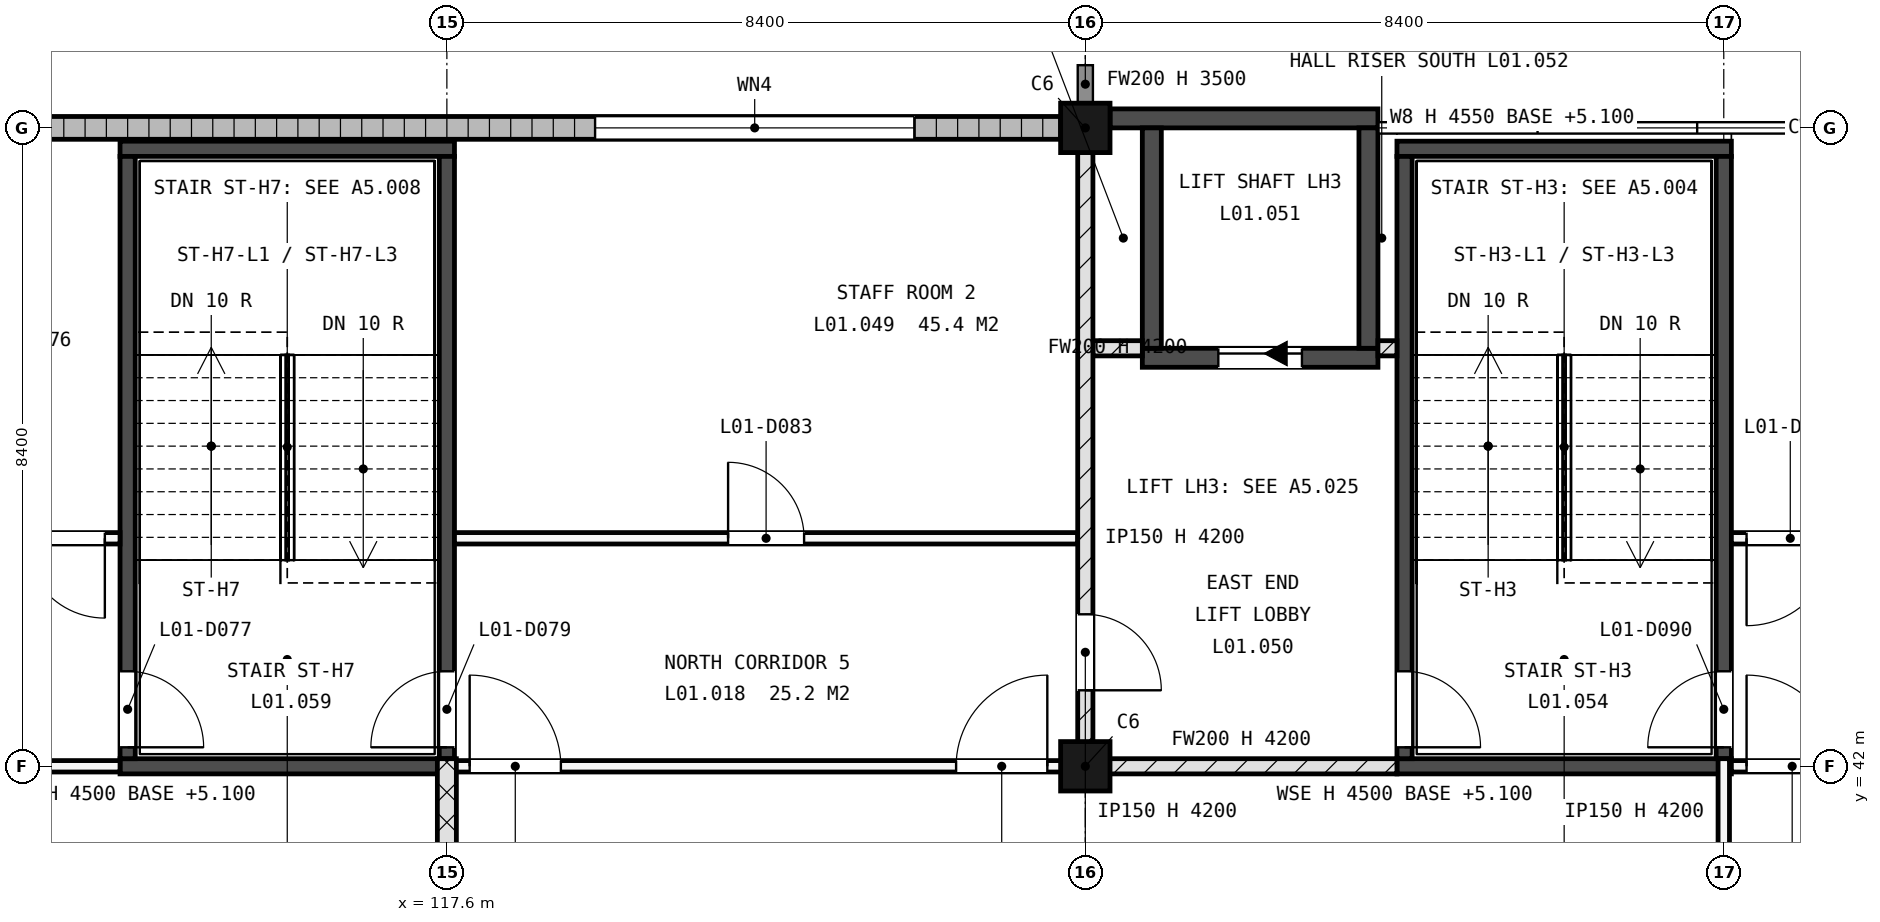
"""IFC4 building model, lengths in metres.
Left out: names, types, materials, properties, quantities, classifications, styles, units other than length and angle.
Written with IfcOpenShell. Run it as: python <this file> out.ifc"""

import sys

from ifc_helpers import new_model, si_unit, direction, frame, frame_2d, origin, origin_2d, place, context, subcontext, project, spatial, rectangle, extrude, element, fill, save


model = new_model("IFC4")
c1 = context("Model", 3, precision=1e-05, world=origin(), true_north=direction((0.0, 1.0)))
c2 = subcontext(c1, "Body", "Model", "MODEL_VIEW")
j1 = project(units=[si_unit("LENGTHUNIT", "METRE"), si_unit("PLANEANGLEUNIT", "RADIAN")], contexts=[c1])
p1 = place(None, origin())
s1 = spatial("IfcSite", under=j1, at=p1, CompositionType="ELEMENT")
p2 = place(p1, origin())
s2 = spatial("IfcBuilding", under=s1, at=p2, CompositionType="ELEMENT")
p3 = place(p2, frame((0.0, 0.0, 5.4)))
s3 = spatial("IfcBuildingStorey", under=s2, at=p3, CompositionType="ELEMENT", Elevation=5.4)
for number, where, z_axis, x_axis in (
    (1, (126.0, 42.0, -0.3), (0.0, 0.0, 1.0), (1.0, 0.0, 0.0)),
    (2, (126.0, 50.4, -0.3), (0.0, 0.0, 1.0), (1.0, 0.0, 0.0)),
):
    element("IfcColumn", number, at=place(p3, frame(where, z_axis=z_axis, x_axis=x_axis)), inside=s3, PredefinedType="COLUMN", context=c2, shape_type="SweptSolid", body=[
        extrude(rectangle(XDim=0.65, YDim=0.65, at=origin_2d()), origin(), (0.0, 0.0, 1.0), 4.55),
    ])
p4 = place(p3, frame((126.75, 47.375, -0.3), z_axis=(0.0, 0.0, 1.0), x_axis=(1.0, 0.0, 0.0)))
e3 = element("IfcWall", 3, at=p4, inside=s3, PredefinedType="SHEAR", context=c2, shape_type="SweptSolid", body=[
    extrude(rectangle(XDim=3.1, YDim=0.25, at=frame_2d((1.55, 0.0))), origin(), (0.0, 0.0, 1.0), 4.55),
])
p5 = place(p4, frame((1.0, 0.0, 0.3)))
e4 = element("IfcOpeningElement", 4, at=p5, cuts=e3, PredefinedType="OPENING", context=c2, shape_type="SweptSolid", body=[
    extrude(rectangle(XDim=1.1, YDim=2.1, at=frame_2d((0.55, 1.05))), frame((0.0, 0.135, 0.0), z_axis=(0.0, -1.0, 0.0), x_axis=(1.0, 0.0, 0.0)), (0.0, 0.0, 1.0), 0.27),
])
p6 = place(p3, frame((126.325, 50.525, -0.3), z_axis=(0.0, 0.0, 1.0), x_axis=(1.0, 0.0, 0.0)))
e5 = element("IfcWall", 5, at=p6, inside=s3, PredefinedType="SHEAR", context=c2, shape_type="SweptSolid", body=[
    extrude(rectangle(XDim=3.525, YDim=0.25, at=frame_2d((1.763, 0.0))), origin(), (0.0, 0.0, 1.0), 4.55),
])
for number, where, z_axis, x_axis in (
    (6, (126.875, 47.5, -0.3), (0.0, 0.0, 1.0), (0.0, 1.0, 0.0)),
    (7, (129.725, 47.5, -0.3), (0.0, 0.0, 1.0), (0.0, 1.0, 0.0)),
):
    element("IfcWall", number, at=place(p3, frame(where, z_axis=z_axis, x_axis=x_axis)), inside=s3, PredefinedType="SHEAR", context=c2, shape_type="SweptSolid", body=[
        extrude(rectangle(XDim=2.9, YDim=0.25, at=frame_2d((1.45, 0.0))), origin(), (0.0, 0.0, 1.0), 4.55),
    ])
p7 = place(p3, frame((109.525, 50.4, 0.0), z_axis=(0.0, 0.0, 1.0), x_axis=(1.0, 0.0, 0.0)))
e8 = element("IfcWall", 8, at=p7, inside=s3, PredefinedType="STANDARD", context=c2, shape_type="SweptSolid", body=[
    extrude(rectangle(XDim=16.15, YDim=0.3, at=frame_2d((8.075, 0.0))), origin(), (0.0, 0.0, 1.0), 4.2),
])
p8 = place(p7, frame((1.337, 0.0, 0.9)))
e9 = element("IfcOpeningElement", 9, at=p8, cuts=e8, PredefinedType="OPENING", context=c2, shape_type="SweptSolid", body=[
    extrude(rectangle(XDim=1.2, YDim=1.5, at=frame_2d((0.6, 0.75))), frame((0.0, 0.16, 0.0), z_axis=(0.0, -1.0, 0.0), x_axis=(1.0, 0.0, 0.0)), (0.0, 0.0, 1.0), 0.32),
])
p9 = place(p7, frame((10.025, 0.0, 0.9)))
e10 = element("IfcOpeningElement", 10, at=p9, cuts=e8, PredefinedType="OPENING", context=c2, shape_type="SweptSolid", body=[
    extrude(rectangle(XDim=4.2, YDim=1.5, at=frame_2d((2.1, 0.75))), frame((0.0, 0.16, 0.0), z_axis=(0.0, -1.0, 0.0), x_axis=(1.0, 0.0, 0.0)), (0.0, 0.0, 1.0), 0.32),
])
for number, where, z_axis, x_axis in (
    (11, (130.1, 42.0, -0.3), (0.0, 0.0, 1.0), (1.0, 0.0, 0.0)),
    (12, (130.1, 50.125, -0.3), (0.0, 0.0, 1.0), (1.0, 0.0, 0.0)),
):
    element("IfcWall", number, at=place(p3, frame(where, z_axis=z_axis, x_axis=x_axis)), inside=s3, PredefinedType="SHEAR", context=c2, shape_type="SweptSolid", body=[
        extrude(rectangle(XDim=4.4, YDim=0.2, at=frame_2d((2.2, 0.0))), origin(), (0.0, 0.0, 1.0), 4.5),
    ])
p10 = place(p3, frame((130.2, 42.1, -0.3), z_axis=(0.0, 0.0, 1.0), x_axis=(0.0, 1.0, 0.0)))
e13 = element("IfcWall", 13, at=p10, inside=s3, PredefinedType="SHEAR", context=c2, shape_type="SweptSolid", body=[
    extrude(rectangle(XDim=7.925, YDim=0.2, at=frame_2d((3.962, 0.0))), origin(), (0.0, 0.0, 1.0), 4.5),
])
p11 = place(p10, frame((0.15, 0.0, 0.3)))
e14 = element("IfcOpeningElement", 14, at=p11, cuts=e13, PredefinedType="OPENING", context=c2, shape_type="SweptSolid", body=[
    extrude(rectangle(XDim=1.0, YDim=2.1, at=frame_2d((0.5, 1.05))), frame((0.0, 0.11, 0.0), z_axis=(0.0, -1.0, 0.0), x_axis=(1.0, 0.0, 0.0)), (0.0, 0.0, 1.0), 0.22),
])
p12 = place(p3, frame((134.4, 42.1, -0.3), z_axis=(0.0, 0.0, 1.0), x_axis=(0.0, 1.0, 0.0)))
e15 = element("IfcWall", 15, at=p12, inside=s3, PredefinedType="SHEAR", context=c2, shape_type="SweptSolid", body=[
    extrude(rectangle(XDim=7.925, YDim=0.2, at=frame_2d((3.962, 0.0))), origin(), (0.0, 0.0, 1.0), 4.5),
])
p13 = place(p12, frame((0.15, 0.0, 0.3)))
e16 = element("IfcOpeningElement", 16, at=p13, cuts=e15, PredefinedType="OPENING", context=c2, shape_type="SweptSolid", body=[
    extrude(rectangle(XDim=1.0, YDim=2.1, at=frame_2d((0.5, 1.05))), frame((0.0, 0.11, 0.0), z_axis=(0.0, -1.0, 0.0), x_axis=(1.0, 0.0, 0.0)), (0.0, 0.0, 1.0), 0.22),
])
for number, where, z_axis, x_axis in (
    (17, (113.3, 42.0, -0.3), (0.0, 0.0, 1.0), (1.0, 0.0, 0.0)),
    (18, (113.3, 50.125, -0.3), (0.0, 0.0, 1.0), (1.0, 0.0, 0.0)),
):
    element("IfcWall", number, at=place(p3, frame(where, z_axis=z_axis, x_axis=x_axis)), inside=s3, PredefinedType="SHEAR", context=c2, shape_type="SweptSolid", body=[
        extrude(rectangle(XDim=4.4, YDim=0.2, at=frame_2d((2.2, 0.0))), origin(), (0.0, 0.0, 1.0), 4.5),
    ])
p14 = place(p3, frame((113.4, 42.1, -0.3), z_axis=(0.0, 0.0, 1.0), x_axis=(0.0, 1.0, 0.0)))
e19 = element("IfcWall", 19, at=p14, inside=s3, PredefinedType="SHEAR", context=c2, shape_type="SweptSolid", body=[
    extrude(rectangle(XDim=7.925, YDim=0.2, at=frame_2d((3.962, 0.0))), origin(), (0.0, 0.0, 1.0), 4.5),
])
p15 = place(p14, frame((0.15, 0.0, 0.3)))
e20 = element("IfcOpeningElement", 20, at=p15, cuts=e19, PredefinedType="OPENING", context=c2, shape_type="SweptSolid", body=[
    extrude(rectangle(XDim=1.0, YDim=2.1, at=frame_2d((0.5, 1.05))), frame((0.0, 0.11, 0.0), z_axis=(0.0, -1.0, 0.0), x_axis=(1.0, 0.0, 0.0)), (0.0, 0.0, 1.0), 0.22),
])
p16 = place(p3, frame((117.6, 42.1, -0.3), z_axis=(0.0, 0.0, 1.0), x_axis=(0.0, 1.0, 0.0)))
e21 = element("IfcWall", 21, at=p16, inside=s3, PredefinedType="SHEAR", context=c2, shape_type="SweptSolid", body=[
    extrude(rectangle(XDim=7.925, YDim=0.2, at=frame_2d((3.962, 0.0))), origin(), (0.0, 0.0, 1.0), 4.5),
])
p17 = place(p16, frame((0.15, 0.0, 0.3)))
e22 = element("IfcOpeningElement", 22, at=p17, cuts=e21, PredefinedType="OPENING", context=c2, shape_type="SweptSolid", body=[
    extrude(rectangle(XDim=1.0, YDim=2.1, at=frame_2d((0.5, 1.05))), frame((0.0, 0.11, 0.0), z_axis=(0.0, -1.0, 0.0), x_axis=(1.0, 0.0, 0.0)), (0.0, 0.0, 1.0), 0.22),
])
p18 = place(p3, frame((108.895, 42.0, 0.0), z_axis=(0.0, 0.0, 1.0), x_axis=(1.0, 0.0, 0.0)))
e23 = element("IfcWall", 23, at=p18, inside=s3, PredefinedType="PARTITIONING", context=c2, shape_type="SweptSolid", body=[
    extrude(rectangle(XDim=4.405, YDim=0.15, at=frame_2d((2.203, 0.0))), origin(), (0.0, 0.0, 1.0), 4.2),
])
p19 = place(p3, frame((117.7, 42.0, 0.0), z_axis=(0.0, 0.0, 1.0), x_axis=(1.0, 0.0, 0.0)))
e24 = element("IfcWall", 24, at=p19, inside=s3, PredefinedType="PARTITIONING", context=c2, shape_type="SweptSolid", body=[
    extrude(rectangle(XDim=8.3, YDim=0.15, at=frame_2d((4.15, 0.0))), origin(), (0.0, 0.0, 1.0), 4.2),
])
p20 = place(p19, frame((0.2, 0.0, 0.0)))
e25 = element("IfcOpeningElement", 25, at=p20, cuts=e24, PredefinedType="OPENING", context=c2, shape_type="SweptSolid", body=[
    extrude(rectangle(XDim=1.2, YDim=2.1, at=frame_2d((0.6, 1.05))), frame((0.0, 0.085, 0.0), z_axis=(0.0, -1.0, 0.0), x_axis=(1.0, 0.0, 0.0)), (0.0, 0.0, 1.0), 0.17),
])
p21 = place(p19, frame((6.6, 0.0, 0.0)))
e26 = element("IfcOpeningElement", 26, at=p21, cuts=e24, PredefinedType="OPENING", context=c2, shape_type="SweptSolid", body=[
    extrude(rectangle(XDim=1.2, YDim=2.1, at=frame_2d((0.6, 1.05))), frame((0.0, 0.085, 0.0), z_axis=(0.0, -1.0, 0.0), x_axis=(1.0, 0.0, 0.0)), (0.0, 0.0, 1.0), 0.17),
])
p22 = place(p3, frame((126.0, 42.0, 0.0), z_axis=(0.0, 0.0, 1.0), x_axis=(1.0, 0.0, 0.0)))
e27 = element("IfcWall", 27, at=p22, inside=s3, PredefinedType="SOLIDWALL", context=c2, shape_type="SweptSolid", body=[
    extrude(rectangle(XDim=4.1, YDim=0.2, at=frame_2d((2.05, 0.0))), origin(), (0.0, 0.0, 1.0), 4.2),
])
p23 = place(p3, frame((134.5, 42.0, 0.0), z_axis=(0.0, 0.0, 1.0), x_axis=(1.0, 0.0, 0.0)))
e28 = element("IfcWall", 28, at=p23, inside=s3, PredefinedType="PARTITIONING", context=c2, shape_type="SweptSolid", body=[
    extrude(rectangle(XDim=8.605, YDim=0.15, at=frame_2d((4.302, 0.0))), origin(), (0.0, 0.0, 1.0), 4.2),
])
p24 = place(p23, frame((0.2, 0.0, 0.0)))
e29 = element("IfcOpeningElement", 29, at=p24, cuts=e28, PredefinedType="OPENING", context=c2, shape_type="SweptSolid", body=[
    extrude(rectangle(XDim=1.2, YDim=2.1, at=frame_2d((0.6, 1.05))), frame((0.0, 0.085, 0.0), z_axis=(0.0, -1.0, 0.0), x_axis=(1.0, 0.0, 0.0)), (0.0, 0.0, 1.0), 0.17),
])
p25 = place(p3, frame((92.5, 45.0, 0.0), z_axis=(0.0, 0.0, 1.0), x_axis=(1.0, 0.0, 0.0)))
e30 = element("IfcWall", 30, at=p25, inside=s3, PredefinedType="PARTITIONING", context=c2, shape_type="SweptSolid", body=[
    extrude(rectangle(XDim=20.8, YDim=0.15, at=frame_2d((10.4, 0.0))), origin(), (0.0, 0.0, 1.0), 4.2),
])
p26 = place(p25, frame((0.2, 0.0, 0.0)))
e31 = element("IfcOpeningElement", 31, at=p26, cuts=e30, PredefinedType="OPENING", context=c2, shape_type="SweptSolid", body=[
    extrude(rectangle(XDim=2.1, YDim=2.25, at=frame_2d((1.05, 1.125))), frame((0.0, 0.085, 0.0), z_axis=(0.0, -1.0, 0.0), x_axis=(1.0, 0.0, 0.0)), (0.0, 0.0, 1.0), 0.17),
])
p27 = place(p25, frame((18.5, 0.0, 0.0)))
e32 = element("IfcOpeningElement", 32, at=p27, cuts=e30, PredefinedType="OPENING", context=c2, shape_type="SweptSolid", body=[
    extrude(rectangle(XDim=2.1, YDim=2.25, at=frame_2d((1.05, 1.125))), frame((0.0, 0.085, 0.0), z_axis=(0.0, -1.0, 0.0), x_axis=(1.0, 0.0, 0.0)), (0.0, 0.0, 1.0), 0.17),
])
p28 = place(p3, frame((117.7, 45.0, 0.0), z_axis=(0.0, 0.0, 1.0), x_axis=(1.0, 0.0, 0.0)))
e33 = element("IfcWall", 33, at=p28, inside=s3, PredefinedType="PARTITIONING", context=c2, shape_type="SweptSolid", body=[
    extrude(rectangle(XDim=8.2, YDim=0.15, at=frame_2d((4.1, 0.0))), origin(), (0.0, 0.0, 1.0), 4.2),
])
p29 = place(p28, frame((3.6, 0.0, 0.0)))
e34 = element("IfcOpeningElement", 34, at=p29, cuts=e33, PredefinedType="OPENING", context=c2, shape_type="SweptSolid", body=[
    extrude(rectangle(XDim=1.0, YDim=2.1, at=frame_2d((0.5, 1.05))), frame((0.0, 0.085, 0.0), z_axis=(0.0, -1.0, 0.0), x_axis=(1.0, 0.0, 0.0)), (0.0, 0.0, 1.0), 0.17),
])
p30 = place(p3, frame((134.5, 45.0, 0.0), z_axis=(0.0, 0.0, 1.0), x_axis=(1.0, 0.0, 0.0)))
e35 = element("IfcWall", 35, at=p30, inside=s3, PredefinedType="PARTITIONING", context=c2, shape_type="SweptSolid", body=[
    extrude(rectangle(XDim=29.2, YDim=0.15, at=frame_2d((14.6, 0.0))), origin(), (0.0, 0.0, 1.0), 4.2),
])
p31 = place(p30, frame((0.2, 0.0, 0.0)))
e36 = element("IfcOpeningElement", 36, at=p31, cuts=e35, PredefinedType="OPENING", context=c2, shape_type="SweptSolid", body=[
    extrude(rectangle(XDim=1.15, YDim=2.1, at=frame_2d((0.575, 1.05))), frame((0.0, 0.085, 0.0), z_axis=(0.0, -1.0, 0.0), x_axis=(1.0, 0.0, 0.0)), (0.0, 0.0, 1.0), 0.17),
])
p32 = place(p30, frame((27.85, 0.0, 0.0)))
e37 = element("IfcOpeningElement", 37, at=p32, cuts=e35, PredefinedType="OPENING", context=c2, shape_type="SweptSolid", body=[
    extrude(rectangle(XDim=1.15, YDim=2.1, at=frame_2d((0.575, 1.05))), frame((0.0, 0.085, 0.0), z_axis=(0.0, -1.0, 0.0), x_axis=(1.0, 0.0, 0.0)), (0.0, 0.0, 1.0), 0.17),
])
p33 = place(p3, frame((126.1, 47.5, 0.0), z_axis=(0.0, 0.0, 1.0), x_axis=(1.0, 0.0, 0.0)))
e38 = element("IfcWall", 38, at=p33, inside=s3, PredefinedType="SOLIDWALL", context=c2, shape_type="SweptSolid", body=[
    extrude(rectangle(XDim=0.65, YDim=0.2, at=frame_2d((0.325, 0.0))), origin(), (0.0, 0.0, 1.0), 4.2),
])
p34 = place(p3, frame((129.85, 47.5, 0.0), z_axis=(0.0, 0.0, 1.0), x_axis=(1.0, 0.0, 0.0)))
e39 = element("IfcWall", 39, at=p34, inside=s3, PredefinedType="SOLIDWALL", context=c2, shape_type="SweptSolid", body=[
    extrude(rectangle(XDim=0.25, YDim=0.2, at=frame_2d((0.125, 0.0))), origin(), (0.0, 0.0, 1.0), 4.2),
])
p35 = place(p3, frame((117.6, 33.295, 0.0), z_axis=(0.0, 0.0, 1.0), x_axis=(0.0, 1.0, 0.0)))
e40 = element("IfcWall", 40, at=p35, inside=s3, PredefinedType="SOLIDWALL", context=c2, shape_type="SweptSolid", body=[
    extrude(rectangle(XDim=8.805, YDim=0.25, at=frame_2d((4.403, 0.0))), origin(), (0.0, 0.0, 1.0), 4.2),
])
p36 = place(p3, frame((126.0, 42.1, 0.0), z_axis=(0.0, 0.0, 1.0), x_axis=(0.0, 1.0, 0.0)))
e41 = element("IfcWall", 41, at=p36, inside=s3, PredefinedType="SOLIDWALL", context=c2, shape_type="SweptSolid", body=[
    extrude(rectangle(XDim=8.3, YDim=0.2, at=frame_2d((4.15, 0.0))), origin(), (0.0, 0.0, 1.0), 3.5),
])
p37 = place(p36, frame((0.9, 0.0, 0.0)))
e42 = element("IfcOpeningElement", 42, at=p37, cuts=e41, PredefinedType="OPENING", context=c2, shape_type="SweptSolid", body=[
    extrude(rectangle(XDim=1.0, YDim=2.1, at=frame_2d((0.5, 1.05))), frame((0.0, 0.11, 0.0), z_axis=(0.0, -1.0, 0.0), x_axis=(1.0, 0.0, 0.0)), (0.0, 0.0, 1.0), 0.22),
])
p38 = place(p3, frame((134.4, 33.295, 0.0), z_axis=(0.0, 0.0, 1.0), x_axis=(0.0, 1.0, 0.0)))
e43 = element("IfcWall", 43, at=p38, inside=s3, PredefinedType="PARTITIONING", context=c2, shape_type="SweptSolid", body=[
    extrude(rectangle(XDim=8.805, YDim=0.15, at=frame_2d((4.403, 0.0))), origin(), (0.0, 0.0, 1.0), 4.2),
])
p39 = place(p9, origin())
e44 = element("IfcWindow", 44, at=p39, inside=s3, PartitioningType="SINGLE_PANEL", PredefinedType="WINDOW", context=c2, shape_type="SweptSolid", body=[
    extrude(rectangle(XDim=4.2, YDim=1.5, at=frame_2d((2.1, 0.75))), frame((0.0, 0.03, 0.0), z_axis=(0.0, -1.0, 0.0), x_axis=(1.0, 0.0, 0.0)), (0.0, 0.0, 1.0), 0.06),
])
fill(e10, e44)
p40 = place(p5, origin())
e45 = element("IfcDoor", 45, at=p40, inside=s3, OperationType="SLIDING_TO_LEFT", PredefinedType="DOOR", context=c2, shape_type="SweptSolid", body=[
    extrude(rectangle(XDim=1.1, YDim=2.1, at=frame_2d((0.55, 1.05))), frame((0.0, 0.025, 0.0), z_axis=(0.0, -1.0, 0.0), x_axis=(1.0, 0.0, 0.0)), (0.0, 0.0, 1.0), 0.05),
])
fill(e4, e45)
p41 = place(p11, origin())
e46 = element("IfcDoor", 46, at=p41, inside=s3, OperationType="SINGLE_SWING_LEFT", PredefinedType="DOOR", context=c2, shape_type="SweptSolid", body=[
    extrude(rectangle(XDim=1.0, YDim=2.1, at=frame_2d((0.5, 1.05))), frame((0.0, 0.025, 0.0), z_axis=(0.0, -1.0, 0.0), x_axis=(1.0, 0.0, 0.0)), (0.0, 0.0, 1.0), 0.05),
])
fill(e14, e46)
p42 = place(p13, origin())
e47 = element("IfcDoor", 47, at=p42, inside=s3, OperationType="SINGLE_SWING_RIGHT", PredefinedType="DOOR", context=c2, shape_type="SweptSolid", body=[
    extrude(rectangle(XDim=1.0, YDim=2.1, at=frame_2d((0.5, 1.05))), frame((0.0, 0.025, 0.0), z_axis=(0.0, -1.0, 0.0), x_axis=(1.0, 0.0, 0.0)), (0.0, 0.0, 1.0), 0.05),
])
fill(e16, e47)
p43 = place(p17, origin())
e48 = element("IfcDoor", 48, at=p43, inside=s3, OperationType="SINGLE_SWING_RIGHT", PredefinedType="DOOR", context=c2, shape_type="SweptSolid", body=[
    extrude(rectangle(XDim=1.0, YDim=2.1, at=frame_2d((0.5, 1.05))), frame((0.0, 0.025, 0.0), z_axis=(0.0, -1.0, 0.0), x_axis=(1.0, 0.0, 0.0)), (0.0, 0.0, 1.0), 0.05),
])
fill(e22, e48)
p44 = place(p15, origin())
e49 = element("IfcDoor", 49, at=p44, inside=s3, OperationType="SINGLE_SWING_LEFT", PredefinedType="DOOR", context=c2, shape_type="SweptSolid", body=[
    extrude(rectangle(XDim=1.0, YDim=2.1, at=frame_2d((0.5, 1.05))), frame((0.0, 0.025, 0.0), z_axis=(0.0, -1.0, 0.0), x_axis=(1.0, 0.0, 0.0)), (0.0, 0.0, 1.0), 0.05),
])
fill(e20, e49)
p45 = place(p27, origin())
e50 = element("IfcDoor", 50, at=p45, inside=s3, OperationType="DOUBLE_DOOR_SINGLE_SWING", PredefinedType="DOOR", context=c2, shape_type="SweptSolid", body=[
    extrude(rectangle(XDim=2.1, YDim=2.25, at=frame_2d((1.05, 1.125))), frame((0.0, 0.025, 0.0), z_axis=(0.0, -1.0, 0.0), x_axis=(1.0, 0.0, 0.0)), (0.0, 0.0, 1.0), 0.05),
])
fill(e32, e50)
p46 = place(p20, origin())
e51 = element("IfcDoor", 51, at=p46, inside=s3, OperationType="SINGLE_SWING_RIGHT", PredefinedType="DOOR", context=c2, shape_type="SweptSolid", body=[
    extrude(rectangle(XDim=1.2, YDim=2.1, at=frame_2d((0.6, 1.05))), frame((0.0, 0.025, 0.0), z_axis=(0.0, -1.0, 0.0), x_axis=(1.0, 0.0, 0.0)), (0.0, 0.0, 1.0), 0.05),
])
fill(e25, e51)
p47 = place(p21, origin())
e52 = element("IfcDoor", 52, at=p47, inside=s3, OperationType="SINGLE_SWING_LEFT", PredefinedType="DOOR", context=c2, shape_type="SweptSolid", body=[
    extrude(rectangle(XDim=1.2, YDim=2.1, at=frame_2d((0.6, 1.05))), frame((0.0, 0.025, 0.0), z_axis=(0.0, -1.0, 0.0), x_axis=(1.0, 0.0, 0.0)), (0.0, 0.0, 1.0), 0.05),
])
fill(e26, e52)
p48 = place(p24, origin())
e53 = element("IfcDoor", 53, at=p48, inside=s3, OperationType="SINGLE_SWING_RIGHT", PredefinedType="DOOR", context=c2, shape_type="SweptSolid", body=[
    extrude(rectangle(XDim=1.2, YDim=2.1, at=frame_2d((0.6, 1.05))), frame((0.0, 0.025, 0.0), z_axis=(0.0, -1.0, 0.0), x_axis=(1.0, 0.0, 0.0)), (0.0, 0.0, 1.0), 0.05),
])
fill(e29, e53)
p49 = place(p29, origin())
e54 = element("IfcDoor", 54, at=p49, inside=s3, OperationType="SINGLE_SWING_RIGHT", PredefinedType="DOOR", context=c2, shape_type="SweptSolid", body=[
    extrude(rectangle(XDim=1.0, YDim=2.1, at=frame_2d((0.5, 1.05))), frame((0.0, 0.025, 0.0), z_axis=(0.0, -1.0, 0.0), x_axis=(1.0, 0.0, 0.0)), (0.0, 0.0, 1.0), 0.05),
])
fill(e34, e54)
p50 = place(p31, origin())
e55 = element("IfcDoor", 55, at=p50, inside=s3, OperationType="SINGLE_SWING_LEFT", PredefinedType="DOOR", context=c2, shape_type="SweptSolid", body=[
    extrude(rectangle(XDim=1.15, YDim=2.1, at=frame_2d((0.575, 1.05))), frame((0.0, 0.025, 0.0), z_axis=(0.0, -1.0, 0.0), x_axis=(1.0, 0.0, 0.0)), (0.0, 0.0, 1.0), 0.05),
])
fill(e36, e55)
p51 = place(p37, origin())
e56 = element("IfcDoor", 56, at=p51, inside=s3, OperationType="SINGLE_SWING_LEFT", PredefinedType="DOOR", context=c2, shape_type="SweptSolid", body=[
    extrude(rectangle(XDim=1.0, YDim=2.1, at=frame_2d((0.5, 1.05))), frame((0.0, 0.025, 0.0), z_axis=(0.0, -1.0, 0.0), x_axis=(1.0, 0.0, 0.0)), (0.0, 0.0, 1.0), 0.05),
])
fill(e42, e56)
save(model, sys.argv[1])
